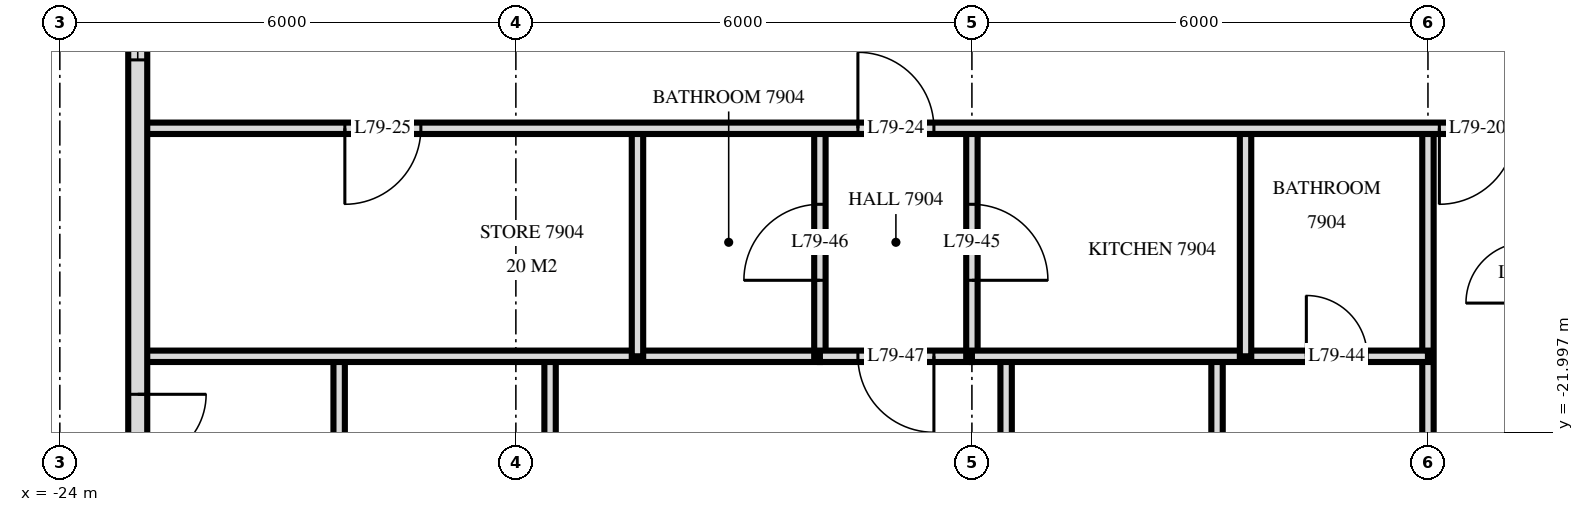
"""IFC4 building model, lengths in metres.
Left out: names, types, materials, properties, quantities, classifications, styles, units other than length and angle.
Written with IfcOpenShell. Run it as: python <this file> out.ifc"""

import sys

from ifc_helpers import new_model, si_unit, direction, frame, frame_2d, origin, place, context, subcontext, project, spatial, rectangle, extrude, element, fill, save


model = new_model("IFC4")
c1 = context("Model", 3, precision=1e-05, world=origin(), true_north=direction((0.0, 1.0)))
c2 = subcontext(c1, "Body", "Model", "MODEL_VIEW")
j1 = project(units=[si_unit("LENGTHUNIT", "METRE"), si_unit("PLANEANGLEUNIT", "RADIAN")], contexts=[c1])
p1 = place(None, origin())
s1 = spatial("IfcSite", under=j1, at=p1, CompositionType="ELEMENT")
p2 = place(p1, origin())
s2 = spatial("IfcBuilding", under=s1, at=p2, CompositionType="ELEMENT")
p3 = place(p2, frame((0.0, 0.0, 298.1)))
s3 = spatial("IfcBuildingStorey", under=s2, at=p3, CompositionType="ELEMENT", Elevation=298.1)
p4 = place(p3, frame((-22.975, -3.325, 0.0), z_axis=(0.0, 0.0, 1.0), x_axis=(0.0, -1.0, 0.0)))
e1 = element("IfcWall", 1, at=p4, inside=s3, PredefinedType="SOLIDWALL", context=c2, shape_type="SweptSolid", body=[
    extrude(rectangle(XDim=25.951, YDim=0.25, at=frame_2d((12.975, 0.0))), origin(), (0.0, 0.0, 1.0), 3.22),
])
p5 = place(p4, frame((0.725, 0.0, 0.0)))
e2 = element("IfcOpeningElement", 2, at=p5, cuts=e1, PredefinedType="OPENING", context=c2, shape_type="SweptSolid", body=[
    extrude(rectangle(XDim=1.8, YDim=2.4, at=frame_2d((0.9, 1.2))), frame((0.0, 0.135, 0.0), z_axis=(0.0, -1.0, 0.0), x_axis=(1.0, 0.0, 0.0)), (0.0, 0.0, 1.0), 0.27),
])
p6 = place(p4, frame((6.575, 0.0, 0.0)))
e3 = element("IfcOpeningElement", 3, at=p6, cuts=e1, PredefinedType="OPENING", context=c2, shape_type="SweptSolid", body=[
    extrude(rectangle(XDim=1.8, YDim=2.4, at=frame_2d((0.9, 1.2))), frame((0.0, 0.135, 0.0), z_axis=(0.0, -1.0, 0.0), x_axis=(1.0, 0.0, 0.0)), (0.0, 0.0, 1.0), 0.27),
])
p7 = place(p4, frame((9.425, 0.0, 0.9)))
e4 = element("IfcOpeningElement", 4, at=p7, cuts=e1, PredefinedType="OPENING", context=c2, shape_type="SweptSolid", body=[
    extrude(rectangle(XDim=1.8, YDim=1.5, at=frame_2d((0.9, 0.75))), frame((0.0, 0.135, 0.0), z_axis=(0.0, -1.0, 0.0), x_axis=(1.0, 0.0, 0.0)), (0.0, 0.0, 1.0), 0.27),
])
p8 = place(p4, frame((12.575, 0.0, 0.9)))
e5 = element("IfcOpeningElement", 5, at=p8, cuts=e1, PredefinedType="OPENING", context=c2, shape_type="SweptSolid", body=[
    extrude(rectangle(XDim=1.2, YDim=1.5, at=frame_2d((0.6, 0.75))), frame((0.0, 0.135, 0.0), z_axis=(0.0, -1.0, 0.0), x_axis=(1.0, 0.0, 0.0)), (0.0, 0.0, 1.0), 0.27),
])
p9 = place(p4, frame((18.175, 0.0, 0.0)))
e6 = element("IfcOpeningElement", 6, at=p9, cuts=e1, PredefinedType="OPENING", context=c2, shape_type="SweptSolid", body=[
    extrude(rectangle(XDim=1.8, YDim=2.4, at=frame_2d((0.9, 1.2))), frame((0.0, 0.135, 0.0), z_axis=(0.0, -1.0, 0.0), x_axis=(1.0, 0.0, 0.0)), (0.0, 0.0, 1.0), 0.27),
])
p10 = place(p4, frame((21.075, 0.0, 0.0)))
e7 = element("IfcOpeningElement", 7, at=p10, cuts=e1, PredefinedType="OPENING", context=c2, shape_type="SweptSolid", body=[
    extrude(rectangle(XDim=1.8, YDim=2.4, at=frame_2d((0.9, 1.2))), frame((0.0, 0.135, 0.0), z_axis=(0.0, -1.0, 0.0), x_axis=(1.0, 0.0, 0.0)), (0.0, 0.0, 1.0), 0.27),
])
p11 = place(p4, frame((23.825, 0.0, 0.9)))
e8 = element("IfcOpeningElement", 8, at=p11, cuts=e1, PredefinedType="OPENING", context=c2, shape_type="SweptSolid", body=[
    extrude(rectangle(XDim=1.8, YDim=1.5, at=frame_2d((0.9, 0.75))), frame((0.0, 0.135, 0.0), z_axis=(0.0, -1.0, 0.0), x_axis=(1.0, 0.0, 0.0)), (0.0, 0.0, 1.0), 0.27),
])
p12 = place(p3, frame((-6.0, -33.62, 0.0), z_axis=(0.0, 0.0, 1.0), x_axis=(0.0, 1.0, 0.0)))
e9 = element("IfcWall", 9, at=p12, inside=s3, PredefinedType="PARTITIONING", context=c2, shape_type="SweptSolid", body=[
    extrude(rectangle(XDim=15.62, YDim=0.15, at=frame_2d((7.81, 0.0))), origin(), (0.0, 0.0, 1.0), 3.22),
])
p13 = place(p3, frame((-8.4, -21.0, 0.0), z_axis=(0.0, 0.0, 1.0), x_axis=(0.0, 1.0, 0.0)))
e10 = element("IfcWall", 10, at=p13, inside=s3, PredefinedType="PARTITIONING", context=c2, shape_type="SweptSolid", body=[
    extrude(rectangle(XDim=3.0, YDim=0.15, at=frame_2d((1.5, 0.0))), origin(), (0.0, 0.0, 1.0), 3.22),
])
p14 = place(p3, frame((-8.775, -33.62, 0.0), z_axis=(0.0, 0.0, 1.0), x_axis=(0.0, 1.0, 0.0)))
e11 = element("IfcWall", 11, at=p14, inside=s3, PredefinedType="PARTITIONING", context=c2, shape_type="SweptSolid", body=[
    extrude(rectangle(XDim=12.62, YDim=0.15, at=frame_2d((6.31, 0.0))), origin(), (0.0, 0.0, 1.0), 3.22),
])
p15 = place(p14, frame((5.77, 0.0, 0.0)))
e12 = element("IfcOpeningElement", 12, at=p15, cuts=e11, PredefinedType="OPENING", context=c2, shape_type="SweptSolid", body=[
    extrude(rectangle(XDim=0.9, YDim=2.1, at=frame_2d((0.45, 1.05))), frame((0.0, 0.085, 0.0), z_axis=(0.0, -1.0, 0.0), x_axis=(1.0, 0.0, 0.0)), (0.0, 0.0, 1.0), 0.17),
])
p16 = place(p3, frame((-11.55, -33.62, 0.0), z_axis=(0.0, 0.0, 1.0), x_axis=(0.0, 1.0, 0.0)))
e13 = element("IfcWall", 13, at=p16, inside=s3, PredefinedType="PARTITIONING", context=c2, shape_type="SweptSolid", body=[
    extrude(rectangle(XDim=12.62, YDim=0.15, at=frame_2d((6.31, 0.0))), origin(), (0.0, 0.0, 1.0), 3.22),
])
p17 = place(p16, frame((5.75, 0.0, 0.0)))
e14 = element("IfcOpeningElement", 14, at=p17, cuts=e13, PredefinedType="OPENING", context=c2, shape_type="SweptSolid", body=[
    extrude(rectangle(XDim=0.9, YDim=2.1, at=frame_2d((0.45, 1.05))), frame((0.0, 0.085, 0.0), z_axis=(0.0, -1.0, 0.0), x_axis=(1.0, 0.0, 0.0)), (0.0, 0.0, 1.0), 0.17),
])
p18 = place(p3, frame((-12.0, -21.0, 0.0), z_axis=(0.0, 0.0, 1.0), x_axis=(0.0, 1.0, 0.0)))
e15 = element("IfcWall", 15, at=p18, inside=s3, PredefinedType="PARTITIONING", context=c2, shape_type="SweptSolid", body=[
    extrude(rectangle(XDim=3.0, YDim=0.15, at=frame_2d((1.5, 0.0))), origin(), (0.0, 0.0, 1.0), 3.22),
])
p19 = place(p18, frame((1.0, 0.0, 0.0)))
e16 = element("IfcOpeningElement", 16, at=p19, cuts=e15, PredefinedType="OPENING", context=c2, shape_type="SweptSolid", body=[
    extrude(rectangle(XDim=1.0, YDim=2.1, at=frame_2d((0.5, 1.05))), frame((0.0, 0.085, 0.0), z_axis=(0.0, -1.0, 0.0), x_axis=(1.0, 0.0, 0.0)), (0.0, 0.0, 1.0), 0.17),
])
p20 = place(p3, frame((-14.0, -21.0, 0.0), z_axis=(0.0, 0.0, 1.0), x_axis=(0.0, 1.0, 0.0)))
e17 = element("IfcWall", 17, at=p20, inside=s3, PredefinedType="PARTITIONING", context=c2, shape_type="SweptSolid", body=[
    extrude(rectangle(XDim=3.0, YDim=0.15, at=frame_2d((1.5, 0.0))), origin(), (0.0, 0.0, 1.0), 3.22),
])
p21 = place(p20, frame((1.0, 0.0, 0.0)))
e18 = element("IfcOpeningElement", 18, at=p21, cuts=e17, PredefinedType="OPENING", context=c2, shape_type="SweptSolid", body=[
    extrude(rectangle(XDim=1.0, YDim=2.1, at=frame_2d((0.5, 1.05))), frame((0.0, 0.085, 0.0), z_axis=(0.0, -1.0, 0.0), x_axis=(1.0, 0.0, 0.0)), (0.0, 0.0, 1.0), 0.17),
])
p22 = place(p3, frame((-16.4, -21.0, 0.0), z_axis=(0.0, 0.0, 1.0), x_axis=(0.0, 1.0, 0.0)))
e19 = element("IfcWall", 19, at=p22, inside=s3, PredefinedType="PARTITIONING", context=c2, shape_type="SweptSolid", body=[
    extrude(rectangle(XDim=3.0, YDim=0.15, at=frame_2d((1.5, 0.0))), origin(), (0.0, 0.0, 1.0), 3.22),
])
p23 = place(p3, frame((-17.55, -33.62, 0.0), z_axis=(0.0, 0.0, 1.0), x_axis=(0.0, 1.0, 0.0)))
e20 = element("IfcWall", 20, at=p23, inside=s3, PredefinedType="PARTITIONING", context=c2, shape_type="SweptSolid", body=[
    extrude(rectangle(XDim=12.62, YDim=0.15, at=frame_2d((6.31, 0.0))), origin(), (0.0, 0.0, 1.0), 3.22),
])
p24 = place(p23, frame((5.79, 0.0, 0.0)))
e21 = element("IfcOpeningElement", 21, at=p24, cuts=e20, PredefinedType="OPENING", context=c2, shape_type="SweptSolid", body=[
    extrude(rectangle(XDim=0.9, YDim=2.1, at=frame_2d((0.45, 1.05))), frame((0.0, 0.085, 0.0), z_axis=(0.0, -1.0, 0.0), x_axis=(1.0, 0.0, 0.0)), (0.0, 0.0, 1.0), 0.17),
])
p25 = place(p3, frame((-20.325, -33.239, 0.0), z_axis=(0.0, 0.0, 1.0), x_axis=(0.0, 1.0, 0.0)))
e22 = element("IfcWall", 22, at=p25, inside=s3, PredefinedType="PARTITIONING", context=c2, shape_type="SweptSolid", body=[
    extrude(rectangle(XDim=12.239, YDim=0.15, at=frame_2d((6.12, 0.0))), origin(), (0.0, 0.0, 1.0), 3.22),
])
p26 = place(p25, frame((5.553, 0.0, 0.0)))
e23 = element("IfcOpeningElement", 23, at=p26, cuts=e22, PredefinedType="OPENING", context=c2, shape_type="SweptSolid", body=[
    extrude(rectangle(XDim=0.9, YDim=2.1, at=frame_2d((0.45, 1.05))), frame((0.0, 0.085, 0.0), z_axis=(0.0, -1.0, 0.0), x_axis=(1.0, 0.0, 0.0)), (0.0, 0.0, 1.0), 0.17),
])
p27 = place(p3, frame((-14.0, -21.0, 0.0), z_axis=(0.0, 0.0, 1.0), x_axis=(1.0, 0.0, 0.0)))
e24 = element("IfcWall", 24, at=p27, inside=s3, PredefinedType="PARTITIONING", context=c2, shape_type="SweptSolid", body=[
    extrude(rectangle(XDim=2.0, YDim=0.15, at=frame_2d((1.0, 0.0))), origin(), (0.0, 0.0, 1.0), 3.22),
])
p28 = place(p27, frame((0.5, 0.0, 0.0)))
e25 = element("IfcOpeningElement", 25, at=p28, cuts=e24, PredefinedType="OPENING", context=c2, shape_type="SweptSolid", body=[
    extrude(rectangle(XDim=1.0, YDim=2.1, at=frame_2d((0.5, 1.05))), frame((0.0, 0.085, 0.0), z_axis=(0.0, -1.0, 0.0), x_axis=(1.0, 0.0, 0.0)), (0.0, 0.0, 1.0), 0.17),
])
p29 = place(p3, frame((-22.92, -21.0, 0.0), z_axis=(0.0, 0.0, 1.0), x_axis=(1.0, 0.0, 0.0)))
e26 = element("IfcWall", 26, at=p29, inside=s3, PredefinedType="PARTITIONING", context=c2, shape_type="SweptSolid", body=[
    extrude(rectangle(XDim=8.92, YDim=0.15, at=frame_2d((4.46, 0.0))), origin(), (0.0, 0.0, 1.0), 3.22),
])
p30 = place(p3, frame((-12.0, -21.0, 0.0), z_axis=(0.0, 0.0, 1.0), x_axis=(1.0, 0.0, 0.0)))
e27 = element("IfcWall", 27, at=p30, inside=s3, PredefinedType="PARTITIONING", context=c2, shape_type="SweptSolid", body=[
    extrude(rectangle(XDim=6.0, YDim=0.15, at=frame_2d((3.0, 0.0))), origin(), (0.0, 0.0, 1.0), 3.22),
])
p31 = place(p30, frame((4.4, 0.0, 0.0)))
e28 = element("IfcOpeningElement", 28, at=p31, cuts=e27, PredefinedType="OPENING", context=c2, shape_type="SweptSolid", body=[
    extrude(rectangle(XDim=0.8, YDim=2.1, at=frame_2d((0.4, 1.05))), frame((0.0, 0.085, 0.0), z_axis=(0.0, -1.0, 0.0), x_axis=(1.0, 0.0, 0.0)), (0.0, 0.0, 1.0), 0.17),
])
p32 = place(p3, frame((-22.92, -18.0, 0.0), z_axis=(0.0, 0.0, 1.0), x_axis=(1.0, 0.0, 0.0)))
e29 = element("IfcWall", 29, at=p32, inside=s3, PredefinedType="PARTITIONING", context=c2, shape_type="SweptSolid", body=[
    extrude(rectangle(XDim=45.84, YDim=0.15, at=frame_2d((22.92, 0.0))), origin(), (0.0, 0.0, 1.0), 3.22),
])
p33 = place(p32, frame((17.07, 0.0, 0.0)))
e30 = element("IfcOpeningElement", 30, at=p33, cuts=e29, PredefinedType="OPENING", context=c2, shape_type="SweptSolid", body=[
    extrude(rectangle(XDim=1.0, YDim=2.1, at=frame_2d((0.5, 1.05))), frame((0.0, 0.085, 0.0), z_axis=(0.0, -1.0, 0.0), x_axis=(1.0, 0.0, 0.0)), (0.0, 0.0, 1.0), 0.17),
])
p34 = place(p32, frame((21.77, 0.0, 0.0)))
e31 = element("IfcOpeningElement", 31, at=p34, cuts=e29, PredefinedType="OPENING", context=c2, shape_type="SweptSolid", body=[
    extrude(rectangle(XDim=1.0, YDim=2.1, at=frame_2d((0.5, 1.05))), frame((0.0, 0.085, 0.0), z_axis=(0.0, -1.0, 0.0), x_axis=(1.0, 0.0, 0.0)), (0.0, 0.0, 1.0), 0.17),
])
p35 = place(p32, frame((28.72, 0.0, 0.0)))
e32 = element("IfcOpeningElement", 32, at=p35, cuts=e29, PredefinedType="OPENING", context=c2, shape_type="SweptSolid", body=[
    extrude(rectangle(XDim=1.0, YDim=2.1, at=frame_2d((0.5, 1.05))), frame((0.0, 0.085, 0.0), z_axis=(0.0, -1.0, 0.0), x_axis=(1.0, 0.0, 0.0)), (0.0, 0.0, 1.0), 0.17),
])
p36 = place(p32, frame((30.52, 0.0, 0.0)))
e33 = element("IfcOpeningElement", 33, at=p36, cuts=e29, PredefinedType="OPENING", context=c2, shape_type="SweptSolid", body=[
    extrude(rectangle(XDim=1.0, YDim=2.1, at=frame_2d((0.5, 1.05))), frame((0.0, 0.085, 0.0), z_axis=(0.0, -1.0, 0.0), x_axis=(1.0, 0.0, 0.0)), (0.0, 0.0, 1.0), 0.17),
])
p37 = place(p32, frame((9.42, 0.0, 0.0)))
e34 = element("IfcOpeningElement", 34, at=p37, cuts=e29, PredefinedType="OPENING", context=c2, shape_type="SweptSolid", body=[
    extrude(rectangle(XDim=1.0, YDim=2.1, at=frame_2d((0.5, 1.05))), frame((0.0, 0.085, 0.0), z_axis=(0.0, -1.0, 0.0), x_axis=(1.0, 0.0, 0.0)), (0.0, 0.0, 1.0), 0.17),
])
p38 = place(p32, frame((2.67, 0.0, 0.0)))
e35 = element("IfcOpeningElement", 35, at=p38, cuts=e29, PredefinedType="OPENING", context=c2, shape_type="SweptSolid", body=[
    extrude(rectangle(XDim=1.0, YDim=2.1, at=frame_2d((0.5, 1.05))), frame((0.0, 0.085, 0.0), z_axis=(0.0, -1.0, 0.0), x_axis=(1.0, 0.0, 0.0)), (0.0, 0.0, 1.0), 0.17),
])
p39 = place(p32, frame((38.42, 0.0, 0.0)))
e36 = element("IfcOpeningElement", 36, at=p39, cuts=e29, PredefinedType="OPENING", context=c2, shape_type="SweptSolid", body=[
    extrude(rectangle(XDim=1.0, YDim=2.1, at=frame_2d((0.5, 1.05))), frame((0.0, 0.085, 0.0), z_axis=(0.0, -1.0, 0.0), x_axis=(1.0, 0.0, 0.0)), (0.0, 0.0, 1.0), 0.17),
])
p40 = place(p32, frame((43.67, 0.0, 0.0)))
e37 = element("IfcOpeningElement", 37, at=p40, cuts=e29, PredefinedType="OPENING", context=c2, shape_type="SweptSolid", body=[
    extrude(rectangle(XDim=1.0, YDim=2.1, at=frame_2d((0.5, 1.05))), frame((0.0, 0.085, 0.0), z_axis=(0.0, -1.0, 0.0), x_axis=(1.0, 0.0, 0.0)), (0.0, 0.0, 1.0), 0.17),
])
p41 = place(p8, origin())
e38 = element("IfcWindow", 38, at=p41, inside=s3, PartitioningType="SINGLE_PANEL", PredefinedType="WINDOW", context=c2, shape_type="SweptSolid", body=[
    extrude(rectangle(XDim=1.2, YDim=1.5, at=frame_2d((0.6, 0.75))), frame((0.0, 0.03, 0.0), z_axis=(0.0, -1.0, 0.0), x_axis=(1.0, 0.0, 0.0)), (0.0, 0.0, 1.0), 0.06),
])
fill(e5, e38)
p42 = place(p9, origin())
e39 = element("IfcDoor", 39, at=p42, inside=s3, OperationType="DOUBLE_DOOR_SINGLE_SWING", PredefinedType="DOOR", context=c2, shape_type="SweptSolid", body=[
    extrude(rectangle(XDim=1.8, YDim=2.4, at=frame_2d((0.9, 1.2))), frame((0.0, 0.025, 0.0), z_axis=(0.0, -1.0, 0.0), x_axis=(1.0, 0.0, 0.0)), (0.0, 0.0, 1.0), 0.05),
])
fill(e6, e39)
p43 = place(p33, frame((0.5, 0.0, 0.0), z_axis=(0.0, 0.0, 1.0), x_axis=(-1.0, 0.0, 0.0)))
e40 = element("IfcDoor", 40, at=p43, inside=s3, OperationType="SINGLE_SWING_LEFT", PredefinedType="DOOR", context=c2, shape_type="SweptSolid", body=[
    extrude(rectangle(XDim=1.0, YDim=2.1, at=frame_2d((0.0, 1.05))), frame((0.0, -0.025, 0.0), z_axis=(0.0, 1.0, 0.0), x_axis=(-1.0, 0.0, 0.0)), (0.0, 0.0, 1.0), 0.05),
])
fill(e30, e40)
p44 = place(p37, origin())
e41 = element("IfcDoor", 41, at=p44, inside=s3, OperationType="SINGLE_SWING_RIGHT", PredefinedType="DOOR", context=c2, shape_type="SweptSolid", body=[
    extrude(rectangle(XDim=1.0, YDim=2.1, at=frame_2d((0.5, 1.05))), frame((0.0, 0.025, 0.0), z_axis=(0.0, -1.0, 0.0), x_axis=(1.0, 0.0, 0.0)), (0.0, 0.0, 1.0), 0.05),
])
fill(e34, e41)
p45 = place(p38, frame((0.5, 0.0, 0.0), z_axis=(0.0, 0.0, 1.0), x_axis=(-1.0, 0.0, 0.0)))
e42 = element("IfcDoor", 42, at=p45, inside=s3, OperationType="SINGLE_SWING_LEFT", PredefinedType="DOOR", context=c2, shape_type="SweptSolid", body=[
    extrude(rectangle(XDim=1.0, YDim=2.1, at=frame_2d((0.0, 1.05))), frame((0.0, -0.025, 0.0), z_axis=(0.0, 1.0, 0.0), x_axis=(-1.0, 0.0, 0.0)), (0.0, 0.0, 1.0), 0.05),
])
fill(e35, e42)
p46 = place(p31, origin())
e43 = element("IfcDoor", 43, at=p46, inside=s3, OperationType="SINGLE_SWING_RIGHT", PredefinedType="DOOR", context=c2, shape_type="SweptSolid", body=[
    extrude(rectangle(XDim=0.8, YDim=2.1, at=frame_2d((0.4, 1.05))), frame((0.0, 0.025, 0.0), z_axis=(0.0, -1.0, 0.0), x_axis=(1.0, 0.0, 0.0)), (0.0, 0.0, 1.0), 0.05),
])
fill(e28, e43)
p47 = place(p19, frame((0.5, 0.0, 0.0), z_axis=(0.0, 0.0, 1.0), x_axis=(-1.0, 0.0, 0.0)))
e44 = element("IfcDoor", 44, at=p47, inside=s3, OperationType="SINGLE_SWING_LEFT", PredefinedType="DOOR", context=c2, shape_type="SweptSolid", body=[
    extrude(rectangle(XDim=1.0, YDim=2.1, at=frame_2d((0.0, 1.05))), frame((0.0, -0.025, 0.0), z_axis=(0.0, 1.0, 0.0), x_axis=(-1.0, 0.0, 0.0)), (0.0, 0.0, 1.0), 0.05),
])
fill(e16, e44)
p48 = place(p21, origin())
e45 = element("IfcDoor", 45, at=p48, inside=s3, OperationType="SINGLE_SWING_RIGHT", PredefinedType="DOOR", context=c2, shape_type="SweptSolid", body=[
    extrude(rectangle(XDim=1.0, YDim=2.1, at=frame_2d((0.5, 1.05))), frame((0.0, 0.025, 0.0), z_axis=(0.0, -1.0, 0.0), x_axis=(1.0, 0.0, 0.0)), (0.0, 0.0, 1.0), 0.05),
])
fill(e18, e45)
p49 = place(p28, frame((0.5, 0.0, 0.0), z_axis=(0.0, 0.0, 1.0), x_axis=(-1.0, 0.0, 0.0)))
e46 = element("IfcDoor", 46, at=p49, inside=s3, OperationType="SINGLE_SWING_RIGHT", PredefinedType="DOOR", context=c2, shape_type="SweptSolid", body=[
    extrude(rectangle(XDim=1.0, YDim=2.1, at=frame_2d((0.0, 1.05))), frame((0.0, -0.025, 0.0), z_axis=(0.0, 1.0, 0.0), x_axis=(-1.0, 0.0, 0.0)), (0.0, 0.0, 1.0), 0.05),
])
fill(e25, e46)
save(model, sys.argv[1])
